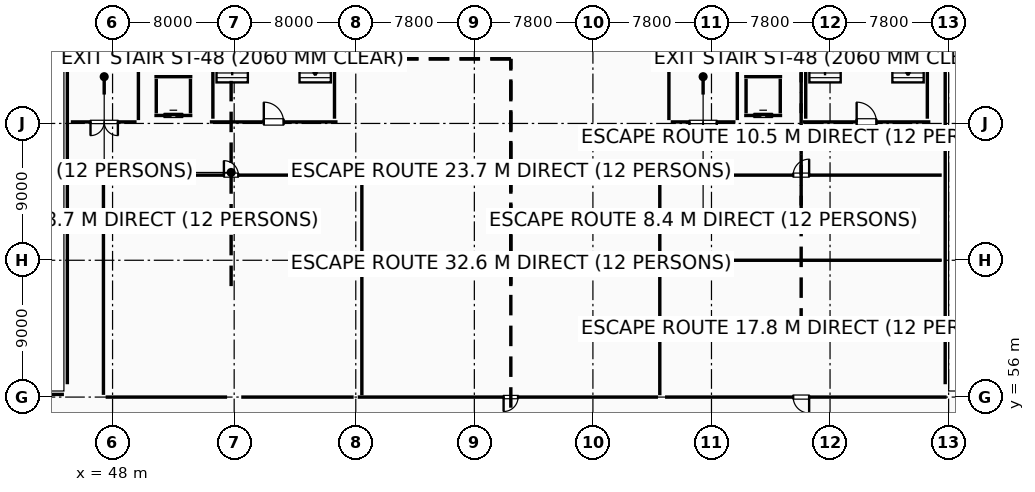
"""IFC4 building model, lengths in metres.
Left out: names, types, materials, properties, quantities, classifications, styles, units other than length and angle.
Written with IfcOpenShell. Run it as: python <this file> out.ifc"""

import sys

from ifc_helpers import new_model, si_unit, direction, frame, frame_2d, origin, origin_2d, place, context, subcontext, project, spatial, rectangle, i_section, extrude, element, fill, save


model = new_model("IFC4")
c1 = context("Model", 3, precision=1e-05, world=origin(), true_north=direction((0.0, 1.0)))
c2 = subcontext(c1, "Body", "Model", "MODEL_VIEW")
j1 = project(units=[si_unit("LENGTHUNIT", "METRE"), si_unit("PLANEANGLEUNIT", "RADIAN")], contexts=[c1])
p1 = place(None, origin())
s1 = spatial("IfcSite", under=j1, at=p1, CompositionType="ELEMENT")
p2 = place(p1, origin())
s2 = spatial("IfcBuilding", under=s1, at=p2, CompositionType="ELEMENT")
p3 = place(p2, frame((0.0, 0.0, -4.8)))
s3 = spatial("IfcBuildingStorey", under=s2, at=p3, CompositionType="ELEMENT", Elevation=-4.8)
p4 = place(p3, frame((48.0, 65.0, 0.0), z_axis=(0.0, 0.0, 1.0), x_axis=(1.0, 0.0, 0.0)))
e1 = element("IfcColumn", 1, at=p4, inside=s3, PredefinedType="COLUMN", context=c2, shape_type="SweptSolid", body=[
    extrude(rectangle(XDim=0.65, YDim=0.65, at=origin_2d()), origin(), (0.0, 0.0, 1.0), 4.8),
])
for number, where, z_axis, x_axis in (
    (2, (56.0, 56.0, 0.0), (0.0, 0.0, 1.0), (1.0, 0.0, 0.0)),
    (3, (56.0, 65.0, 0.0), (0.0, 0.0, 1.0), (1.0, 0.0, 0.0)),
):
    element("IfcColumn", number, at=place(p3, frame(where, z_axis=z_axis, x_axis=x_axis)), inside=s3, PredefinedType="COLUMN", context=c2, shape_type="SweptSolid", body=[
        extrude(rectangle(XDim=0.9, YDim=0.9, at=origin_2d()), origin(), (0.0, 0.0, 1.0), 4.8),
    ])
for number, where, z_axis, x_axis in (
    (4, (64.0, 56.0, 0.0), (0.0, 0.0, 1.0), (1.0, 0.0, 0.0)),
    (5, (64.0, 65.0, 0.0), (0.0, 0.0, 1.0), (1.0, 0.0, 0.0)),
    (6, (64.0, 74.0, 0.0), (0.0, 0.0, 1.0), (1.0, 0.0, 0.0)),
    (7, (71.8, 74.0, 0.0), (0.0, 0.0, 1.0), (1.0, 0.0, 0.0)),
    (8, (79.6, 74.0, 0.0), (0.0, 0.0, 1.0), (1.0, 0.0, 0.0)),
    (9, (103.0, 56.0, 0.0), (0.0, 0.0, 1.0), (1.0, 0.0, 0.0)),
    (10, (103.0, 65.0, 0.0), (0.0, 0.0, 1.0), (1.0, 0.0, 0.0)),
    (11, (103.0, 74.0, 0.0), (0.0, 0.0, 1.0), (1.0, 0.0, 0.0)),
):
    element("IfcColumn", number, at=place(p3, frame(where, z_axis=z_axis, x_axis=x_axis)), inside=s3, PredefinedType="COLUMN", context=c2, shape_type="SweptSolid", body=[
        extrude(i_section(OverallWidth=0.25, OverallDepth=0.45, WebThickness=0.011, FlangeThickness=0.014, FilletRadius=0.015, at=origin_2d()), origin(), (0.0, 0.0, 1.0), 4.8),
    ])
for number, where, z_axis, x_axis in (
    (12, (54.0, 65.7, 0.0), (0.0, 0.0, 1.0), (1.0, 0.0, 0.0)),
    (13, (54.0, 69.8, 0.0), (0.0, 0.0, 1.0), (1.0, 0.0, 0.0)),
):
    element("IfcColumn", number, at=place(p3, frame(where, z_axis=z_axis, x_axis=x_axis)), inside=s3, PredefinedType="COLUMN", context=c2, shape_type="SweptSolid", body=[
        extrude(i_section(OverallWidth=0.25, OverallDepth=0.35, WebThickness=0.01, FlangeThickness=0.012, FilletRadius=0.012, at=origin_2d()), origin(), (0.0, 0.0, 1.0), 4.8),
    ])
p5 = place(p3, frame((16.4, 56.175, 0.0), z_axis=(0.0, 0.0, 1.0), x_axis=(1.0, 0.0, 0.0)))
e14 = element("IfcWall", 14, at=p5, inside=s3, PredefinedType="USERDEFINED", context=c2, shape_type="SweptSolid", body=[
    extrude(rectangle(XDim=28.4, YDim=0.45, at=frame_2d((14.2, 0.0))), origin(), (0.0, 0.0, 1.0), 4.38),
])
for number, where, z_axis, x_axis in (
    (15, (45.025, 56.845, 0.0), (0.0, 0.0, 1.0), (0.0, 1.0, 0.0)),
    (16, (102.775, 82.755, 0.0), (0.0, 0.0, 1.0), (0.0, -1.0, 0.0)),
):
    element("IfcWall", number, at=place(p3, frame(where, z_axis=z_axis, x_axis=x_axis)), inside=s3, PredefinedType="USERDEFINED", context=c2, shape_type="SweptSolid", body=[
        extrude(rectangle(XDim=25.91, YDim=0.45, at=frame_2d((12.955, 0.0))), origin(), (0.0, 0.0, 1.0), 4.38),
    ])
p6 = place(p3, frame((54.4, 74.1, 0.0), z_axis=(0.0, 0.0, 1.0), x_axis=(1.0, 0.0, 0.0)))
e17 = element("IfcWall", 17, at=p6, inside=s3, PredefinedType="SHEAR", context=c2, shape_type="SweptSolid", body=[
    extrude(rectangle(XDim=8.4, YDim=0.4, at=frame_2d((4.2, 0.0))), origin(), (0.0, 0.0, 1.0), 4.48),
])
p7 = place(p6, frame((3.55, 0.0, 0.0)))
e18 = element("IfcOpeningElement", 18, at=p7, cuts=e17, PredefinedType="OPENING", context=c2, shape_type="SweptSolid", body=[
    extrude(rectangle(XDim=1.3, YDim=2.15, at=frame_2d((0.65, 1.075))), frame((0.0, 0.21, 0.0), z_axis=(0.0, -1.0, 0.0), x_axis=(1.0, 0.0, 0.0)), (0.0, 0.0, 1.0), 0.42),
])
for number, where, z_axis, x_axis in (
    (19, (62.6, 74.31, 0.0), (0.0, 0.0, 1.0), (0.0, 1.0, 0.0)),
    (20, (54.6, 82.69, 0.0), (0.0, 0.0, 1.0), (0.0, -1.0, 0.0)),
):
    element("IfcWall", number, at=place(p3, frame(where, z_axis=z_axis, x_axis=x_axis)), inside=s3, PredefinedType="SHEAR", context=c2, shape_type="SweptSolid", body=[
        extrude(rectangle(XDim=8.38, YDim=0.4, at=frame_2d((4.19, 0.0))), origin(), (0.0, 0.0, 1.0), 4.48),
    ])
p8 = place(p3, frame((50.75, 74.525, 0.0), z_axis=(0.0, 0.0, 1.0), x_axis=(1.0, 0.0, 0.0)))
e21 = element("IfcWall", 21, at=p8, inside=s3, PredefinedType="STANDARD", context=c2, shape_type="SweptSolid", body=[
    extrude(rectangle(XDim=2.5, YDim=0.25, at=frame_2d((1.25, 0.0))), origin(), (0.0, 0.0, 1.0), 4.47),
])
p9 = place(p8, frame((0.65, 0.0, 0.0)))
e22 = element("IfcOpeningElement", 22, at=p9, cuts=e21, PredefinedType="OPENING", context=c2, shape_type="SweptSolid", body=[
    extrude(rectangle(XDim=1.2, YDim=2.05, at=frame_2d((0.6, 1.025))), frame((0.0, 0.135, 0.0), z_axis=(0.0, -1.0, 0.0), x_axis=(1.0, 0.0, 0.0)), (0.0, 0.0, 1.0), 0.27),
])
p10 = place(p3, frame((53.25, 77.075, 0.0), z_axis=(0.0, 0.0, 1.0), x_axis=(-1.0, 0.0, 0.0)))
e23 = element("IfcWall", 23, at=p10, inside=s3, PredefinedType="STANDARD", context=c2, shape_type="SweptSolid", body=[
    extrude(rectangle(XDim=2.5, YDim=0.25, at=frame_2d((1.25, 0.0))), origin(), (0.0, 0.0, 1.0), 4.47),
])
for number, where, z_axis, x_axis in (
    (24, (53.125, 74.66, 0.0), (0.0, 0.0, 1.0), (0.0, 1.0, 0.0)),
    (25, (50.875, 76.94, 0.0), (0.0, 0.0, 1.0), (0.0, -1.0, 0.0)),
):
    element("IfcWall", number, at=place(p3, frame(where, z_axis=z_axis, x_axis=x_axis)), inside=s3, PredefinedType="STANDARD", context=c2, shape_type="SweptSolid", body=[
        extrude(rectangle(XDim=2.28, YDim=0.25, at=frame_2d((1.14, 0.0))), origin(), (0.0, 0.0, 1.0), 4.47),
    ])
p11 = place(p3, frame((93.4, 74.1, 0.0), z_axis=(0.0, 0.0, 1.0), x_axis=(1.0, 0.0, 0.0)))
e26 = element("IfcWall", 26, at=p11, inside=s3, PredefinedType="SHEAR", context=c2, shape_type="SweptSolid", body=[
    extrude(rectangle(XDim=8.4, YDim=0.4, at=frame_2d((4.2, 0.0))), origin(), (0.0, 0.0, 1.0), 4.48),
])
p12 = place(p11, frame((3.55, 0.0, 0.0)))
e27 = element("IfcOpeningElement", 27, at=p12, cuts=e26, PredefinedType="OPENING", context=c2, shape_type="SweptSolid", body=[
    extrude(rectangle(XDim=1.3, YDim=2.15, at=frame_2d((0.65, 1.075))), frame((0.0, 0.21, 0.0), z_axis=(0.0, -1.0, 0.0), x_axis=(1.0, 0.0, 0.0)), (0.0, 0.0, 1.0), 0.42),
])
for number, where, z_axis, x_axis in (
    (28, (101.6, 74.31, 0.0), (0.0, 0.0, 1.0), (0.0, 1.0, 0.0)),
    (29, (93.6, 82.69, 0.0), (0.0, 0.0, 1.0), (0.0, -1.0, 0.0)),
):
    element("IfcWall", number, at=place(p3, frame(where, z_axis=z_axis, x_axis=x_axis)), inside=s3, PredefinedType="SHEAR", context=c2, shape_type="SweptSolid", body=[
        extrude(rectangle(XDim=8.38, YDim=0.4, at=frame_2d((4.19, 0.0))), origin(), (0.0, 0.0, 1.0), 4.48),
    ])
p13 = place(p3, frame((89.55, 74.525, 0.0), z_axis=(0.0, 0.0, 1.0), x_axis=(1.0, 0.0, 0.0)))
e30 = element("IfcWall", 30, at=p13, inside=s3, PredefinedType="STANDARD", context=c2, shape_type="SweptSolid", body=[
    extrude(rectangle(XDim=2.5, YDim=0.25, at=frame_2d((1.25, 0.0))), origin(), (0.0, 0.0, 1.0), 4.47),
])
p14 = place(p13, frame((0.65, 0.0, 0.0)))
e31 = element("IfcOpeningElement", 31, at=p14, cuts=e30, PredefinedType="OPENING", context=c2, shape_type="SweptSolid", body=[
    extrude(rectangle(XDim=1.2, YDim=2.05, at=frame_2d((0.6, 1.025))), frame((0.0, 0.135, 0.0), z_axis=(0.0, -1.0, 0.0), x_axis=(1.0, 0.0, 0.0)), (0.0, 0.0, 1.0), 0.27),
])
p15 = place(p3, frame((92.05, 77.075, 0.0), z_axis=(0.0, 0.0, 1.0), x_axis=(-1.0, 0.0, 0.0)))
e32 = element("IfcWall", 32, at=p15, inside=s3, PredefinedType="STANDARD", context=c2, shape_type="SweptSolid", body=[
    extrude(rectangle(XDim=2.5, YDim=0.25, at=frame_2d((1.25, 0.0))), origin(), (0.0, 0.0, 1.0), 4.47),
])
for number, where, z_axis, x_axis in (
    (33, (91.925, 74.66, 0.0), (0.0, 0.0, 1.0), (0.0, 1.0, 0.0)),
    (34, (89.675, 76.94, 0.0), (0.0, 0.0, 1.0), (0.0, -1.0, 0.0)),
):
    element("IfcWall", number, at=place(p3, frame(where, z_axis=z_axis, x_axis=x_axis)), inside=s3, PredefinedType="STANDARD", context=c2, shape_type="SweptSolid", body=[
        extrude(rectangle(XDim=2.28, YDim=0.25, at=frame_2d((1.14, 0.0))), origin(), (0.0, 0.0, 1.0), 4.47),
    ])
p16 = place(p3, frame((85.65, 78.775, 0.0), z_axis=(0.0, 0.0, 1.0), x_axis=(1.0, 0.0, 0.0)))
e35 = element("IfcWall", 35, at=p16, inside=s3, PredefinedType="STANDARD", context=c2, shape_type="SweptSolid", body=[
    extrude(rectangle(XDim=2.3, YDim=0.25, at=frame_2d((1.15, 0.0))), origin(), (0.0, 0.0, 1.0), 4.47),
])
p17 = place(p3, frame((45.254, 77.7, 0.0), z_axis=(0.0, 0.0, 1.0), x_axis=(1.0, 0.0, 0.0)))
e36 = element("IfcWall", 36, at=p17, inside=s3, PredefinedType="PARTITIONING", context=c2, shape_type="SweptSolid", body=[
    extrude(rectangle(XDim=4.326, YDim=0.2, at=frame_2d((2.163, 0.0))), origin(), (0.0, 0.0, 1.0), 4.47),
])
p18 = place(p3, frame((49.7, 77.58, 0.0), z_axis=(0.0, 0.0, 1.0), x_axis=(0.0, -1.0, 0.0)))
e37 = element("IfcWall", 37, at=p18, inside=s3, PredefinedType="PARTITIONING", context=c2, shape_type="SweptSolid", body=[
    extrude(rectangle(XDim=3.36, YDim=0.2, at=frame_2d((1.68, 0.0))), origin(), (0.0, 0.0, 1.0), 4.47),
])
p19 = place(p3, frame((49.58, 74.1, 0.0), z_axis=(0.0, 0.0, 1.0), x_axis=(-1.0, 0.0, 0.0)))
e38 = element("IfcWall", 38, at=p19, inside=s3, PredefinedType="PARTITIONING", context=c2, shape_type="SweptSolid", body=[
    extrude(rectangle(XDim=4.326, YDim=0.2, at=frame_2d((2.163, 0.0))), origin(), (0.0, 0.0, 1.0), 4.47),
])
p20 = place(p19, frame((1.23, 0.0, 0.0)))
e39 = element("IfcOpeningElement", 39, at=p20, cuts=e38, PredefinedType="OPENING", context=c2, shape_type="SweptSolid", body=[
    extrude(rectangle(XDim=1.8, YDim=2.15, at=frame_2d((0.9, 1.075))), frame((0.0, 0.11, 0.0), z_axis=(0.0, -1.0, 0.0), x_axis=(1.0, 0.0, 0.0)), (0.0, 0.0, 1.0), 0.22),
])
p21 = place(p3, frame((84.6, 74.22, 0.0), z_axis=(0.0, 0.0, 1.0), x_axis=(0.0, 1.0, 0.0)))
e40 = element("IfcWall", 40, at=p21, inside=s3, PredefinedType="PARTITIONING", context=c2, shape_type="SweptSolid", body=[
    extrude(rectangle(XDim=3.36, YDim=0.2, at=frame_2d((1.68, 0.0))), origin(), (0.0, 0.0, 1.0), 4.47),
])
p22 = place(p3, frame((84.72, 77.7, 0.0), z_axis=(0.0, 0.0, 1.0), x_axis=(1.0, 0.0, 0.0)))
e41 = element("IfcWall", 41, at=p22, inside=s3, PredefinedType="PARTITIONING", context=c2, shape_type="SweptSolid", body=[
    extrude(rectangle(XDim=4.26, YDim=0.2, at=frame_2d((2.13, 0.0))), origin(), (0.0, 0.0, 1.0), 4.47),
])
p23 = place(p3, frame((89.1, 77.58, 0.0), z_axis=(0.0, 0.0, 1.0), x_axis=(0.0, -1.0, 0.0)))
e42 = element("IfcWall", 42, at=p23, inside=s3, PredefinedType="PARTITIONING", context=c2, shape_type="SweptSolid", body=[
    extrude(rectangle(XDim=3.36, YDim=0.2, at=frame_2d((1.68, 0.0))), origin(), (0.0, 0.0, 1.0), 4.47),
])
p24 = place(p3, frame((88.98, 74.1, 0.0), z_axis=(0.0, 0.0, 1.0), x_axis=(-1.0, 0.0, 0.0)))
e43 = element("IfcWall", 43, at=p24, inside=s3, PredefinedType="PARTITIONING", context=c2, shape_type="SweptSolid", body=[
    extrude(rectangle(XDim=4.26, YDim=0.2, at=frame_2d((2.13, 0.0))), origin(), (0.0, 0.0, 1.0), 4.39),
])
p25 = place(p24, frame((1.23, 0.0, 0.0)))
e44 = element("IfcOpeningElement", 44, at=p25, cuts=e43, PredefinedType="OPENING", context=c2, shape_type="SweptSolid", body=[
    extrude(rectangle(XDim=1.8, YDim=2.15, at=frame_2d((0.9, 1.075))), frame((0.0, 0.11, 0.0), z_axis=(0.0, -1.0, 0.0), x_axis=(1.0, 0.0, 0.0)), (0.0, 0.0, 1.0), 0.22),
])
p26 = place(p3, frame((64.52, 70.6, 0.0), z_axis=(0.0, 0.0, 1.0), x_axis=(1.0, 0.0, 0.0)))
e45 = element("IfcWall", 45, at=p26, inside=s3, PredefinedType="PARTITIONING", context=c2, shape_type="SweptSolid", body=[
    extrude(rectangle(XDim=19.36, YDim=0.2, at=frame_2d((9.68, 0.0))), origin(), (0.0, 0.0, 1.0), 4.39),
])
p27 = place(p26, frame((9.205, 0.0, 0.0)))
e46 = element("IfcOpeningElement", 46, at=p27, cuts=e45, PredefinedType="OPENING", context=c2, shape_type="SweptSolid", body=[
    extrude(rectangle(XDim=0.95, YDim=2.15, at=frame_2d((0.475, 1.075))), frame((0.0, 0.11, 0.0), z_axis=(0.0, -1.0, 0.0), x_axis=(1.0, 0.0, 0.0)), (0.0, 0.0, 1.0), 0.22),
])
p28 = place(p3, frame((84.0, 70.48, 0.0), z_axis=(0.0, 0.0, 1.0), x_axis=(0.0, -1.0, 0.0)))
e47 = element("IfcWall", 47, at=p28, inside=s3, PredefinedType="PARTITIONING", context=c2, shape_type="SweptSolid", body=[
    extrude(rectangle(XDim=14.36, YDim=0.2, at=frame_2d((7.18, 0.0))), origin(), (0.0, 0.0, 1.0), 4.39),
])
p29 = place(p3, frame((83.88, 56.0, 0.0), z_axis=(0.0, 0.0, 1.0), x_axis=(-1.0, 0.0, 0.0)))
e48 = element("IfcWall", 48, at=p29, inside=s3, PredefinedType="PARTITIONING", context=c2, shape_type="SweptSolid", body=[
    extrude(rectangle(XDim=19.751, YDim=0.2, at=frame_2d((9.875, 0.0))), origin(), (0.0, 0.0, 1.0), 3.78),
])
p30 = place(p29, frame((9.205, 0.0, 0.0)))
e49 = element("IfcOpeningElement", 49, at=p30, cuts=e48, PredefinedType="OPENING", context=c2, shape_type="SweptSolid", body=[
    extrude(rectangle(XDim=0.95, YDim=2.15, at=frame_2d((0.475, 1.075))), frame((0.0, 0.11, 0.0), z_axis=(0.0, -1.0, 0.0), x_axis=(1.0, 0.0, 0.0)), (0.0, 0.0, 1.0), 0.22),
])
p31 = place(p3, frame((64.4, 56.12, 0.0), z_axis=(0.0, 0.0, 1.0), x_axis=(0.0, 1.0, 0.0)))
e50 = element("IfcWall", 50, at=p31, inside=s3, PredefinedType="PARTITIONING", context=c2, shape_type="SweptSolid", body=[
    extrude(rectangle(XDim=14.36, YDim=0.2, at=frame_2d((7.18, 0.0))), origin(), (0.0, 0.0, 1.0), 3.38),
])
p32 = place(p3, frame((84.345, 65.0, 0.0), z_axis=(0.0, 0.0, 1.0), x_axis=(1.0, 0.0, 0.0)))
e51 = element("IfcWall", 51, at=p32, inside=s3, PredefinedType="PARTITIONING", context=c2, shape_type="SweptSolid", body=[
    extrude(rectangle(XDim=18.201, YDim=0.25, at=frame_2d((9.101, 0.0))), origin(), (0.0, 0.0, 1.0), 3.78),
])
p33 = place(p3, frame((102.871, 56.0, 0.0), z_axis=(0.0, 0.0, 1.0), x_axis=(-1.0, 0.0, 0.0)))
e52 = element("IfcWall", 52, at=p33, inside=s3, PredefinedType="PARTITIONING", context=c2, shape_type="SweptSolid", body=[
    extrude(rectangle(XDim=18.526, YDim=0.25, at=frame_2d((9.263, 0.0))), origin(), (0.0, 0.0, 1.0), 3.78),
])
p34 = place(p33, frame((9.046, 0.0, 0.0)))
e53 = element("IfcOpeningElement", 53, at=p34, cuts=e52, PredefinedType="OPENING", context=c2, shape_type="SweptSolid", body=[
    extrude(rectangle(XDim=1.05, YDim=2.15, at=frame_2d((0.525, 1.075))), frame((0.0, 0.135, 0.0), z_axis=(0.0, -1.0, 0.0), x_axis=(1.0, 0.0, 0.0)), (0.0, 0.0, 1.0), 0.27),
])
p35 = place(p3, frame((84.345, 70.6, 0.0), z_axis=(0.0, 0.0, 1.0), x_axis=(1.0, 0.0, 0.0)))
e54 = element("IfcWall", 54, at=p35, inside=s3, PredefinedType="PARTITIONING", context=c2, shape_type="SweptSolid", body=[
    extrude(rectangle(XDim=18.201, YDim=0.25, at=frame_2d((9.101, 0.0))), origin(), (0.0, 0.0, 1.0), 4.39),
])
p36 = place(p35, frame((8.43, 0.0, 0.0)))
e55 = element("IfcOpeningElement", 55, at=p36, cuts=e54, PredefinedType="OPENING", context=c2, shape_type="SweptSolid", body=[
    extrude(rectangle(XDim=1.05, YDim=2.15, at=frame_2d((0.525, 1.075))), frame((0.0, 0.135, 0.0), z_axis=(0.0, -1.0, 0.0), x_axis=(1.0, 0.0, 0.0)), (0.0, 0.0, 1.0), 0.27),
])
p37 = place(p3, frame((47.545, 70.6, 0.0), z_axis=(0.0, 0.0, 1.0), x_axis=(1.0, 0.0, 0.0)))
e56 = element("IfcWall", 56, at=p37, inside=s3, PredefinedType="PARTITIONING", context=c2, shape_type="SweptSolid", body=[
    extrude(rectangle(XDim=16.51, YDim=0.25, at=frame_2d((8.255, 0.0))), origin(), (0.0, 0.0, 1.0), 4.39),
])
p38 = place(p37, frame((7.78, 0.0, 0.0)))
e57 = element("IfcOpeningElement", 57, at=p38, cuts=e56, PredefinedType="OPENING", context=c2, shape_type="SweptSolid", body=[
    extrude(rectangle(XDim=0.95, YDim=2.15, at=frame_2d((0.475, 1.075))), frame((0.0, 0.135, 0.0), z_axis=(0.0, -1.0, 0.0), x_axis=(1.0, 0.0, 0.0)), (0.0, 0.0, 1.0), 0.27),
])
p39 = place(p3, frame((63.86, 56.0, 0.0), z_axis=(0.0, 0.0, 1.0), x_axis=(-1.0, 0.0, 0.0)))
e58 = element("IfcWall", 58, at=p39, inside=s3, PredefinedType="PARTITIONING", context=c2, shape_type="SweptSolid", body=[
    extrude(rectangle(XDim=7.395, YDim=0.25, at=frame_2d((3.698, 0.0))), origin(), (0.0, 0.0, 1.0), 4.08),
])
p40 = place(p3, frame((55.535, 56.0, 0.0), z_axis=(0.0, 0.0, 1.0), x_axis=(-1.0, 0.0, 0.0)))
e59 = element("IfcWall", 59, at=p40, inside=s3, PredefinedType="PARTITIONING", context=c2, shape_type="SweptSolid", body=[
    extrude(rectangle(XDim=7.99, YDim=0.25, at=frame_2d((3.995, 0.0))), origin(), (0.0, 0.0, 1.0), 4.47),
])
p41 = place(p3, frame((47.4, 56.145, 0.0), z_axis=(0.0, 0.0, 1.0), x_axis=(0.0, 1.0, 0.0)))
e60 = element("IfcWall", 60, at=p41, inside=s3, PredefinedType="PARTITIONING", context=c2, shape_type="SweptSolid", body=[
    extrude(rectangle(XDim=14.31, YDim=0.25, at=frame_2d((7.155, 0.0))), origin(), (0.0, 0.0, 1.0), 4.47),
])
p42 = place(p7, origin())
e61 = element("IfcDoor", 61, at=p42, inside=s3, OperationType="SINGLE_SWING_LEFT", PredefinedType="DOOR", context=c2, shape_type="SweptSolid", body=[
    extrude(rectangle(XDim=1.3, YDim=2.15, at=frame_2d((0.65, 1.075))), frame((0.0, 0.025, 0.0), z_axis=(0.0, -1.0, 0.0), x_axis=(1.0, 0.0, 0.0)), (0.0, 0.0, 1.0), 0.05),
])
fill(e18, e61)
p43 = place(p9, origin())
e62 = element("IfcDoor", 62, at=p43, inside=s3, OperationType="DOUBLE_DOOR_SLIDING", PredefinedType="DOOR", context=c2, shape_type="SweptSolid", body=[
    extrude(rectangle(XDim=1.2, YDim=2.05, at=frame_2d((0.6, 1.025))), frame((0.0, 0.025, 0.0), z_axis=(0.0, -1.0, 0.0), x_axis=(1.0, 0.0, 0.0)), (0.0, 0.0, 1.0), 0.05),
])
fill(e22, e62)
p44 = place(p12, origin())
e63 = element("IfcDoor", 63, at=p44, inside=s3, OperationType="SINGLE_SWING_LEFT", PredefinedType="DOOR", context=c2, shape_type="SweptSolid", body=[
    extrude(rectangle(XDim=1.3, YDim=2.15, at=frame_2d((0.65, 1.075))), frame((0.0, 0.025, 0.0), z_axis=(0.0, -1.0, 0.0), x_axis=(1.0, 0.0, 0.0)), (0.0, 0.0, 1.0), 0.05),
])
fill(e27, e63)
p45 = place(p14, origin())
e64 = element("IfcDoor", 64, at=p45, inside=s3, OperationType="DOUBLE_DOOR_SLIDING", PredefinedType="DOOR", context=c2, shape_type="SweptSolid", body=[
    extrude(rectangle(XDim=1.2, YDim=2.05, at=frame_2d((0.6, 1.025))), frame((0.0, 0.025, 0.0), z_axis=(0.0, -1.0, 0.0), x_axis=(1.0, 0.0, 0.0)), (0.0, 0.0, 1.0), 0.05),
])
fill(e31, e64)
p46 = place(p20, origin())
e65 = element("IfcDoor", 65, at=p46, inside=s3, OperationType="DOUBLE_DOOR_SINGLE_SWING", PredefinedType="DOOR", context=c2, shape_type="SweptSolid", body=[
    extrude(rectangle(XDim=1.8, YDim=2.15, at=frame_2d((0.9, 1.075))), frame((0.0, 0.025, 0.0), z_axis=(0.0, -1.0, 0.0), x_axis=(1.0, 0.0, 0.0)), (0.0, 0.0, 1.0), 0.05),
])
fill(e39, e65)
p47 = place(p25, origin())
e66 = element("IfcDoor", 66, at=p47, inside=s3, OperationType="DOUBLE_DOOR_SINGLE_SWING", PredefinedType="DOOR", context=c2, shape_type="SweptSolid", body=[
    extrude(rectangle(XDim=1.8, YDim=2.15, at=frame_2d((0.9, 1.075))), frame((0.0, 0.025, 0.0), z_axis=(0.0, -1.0, 0.0), x_axis=(1.0, 0.0, 0.0)), (0.0, 0.0, 1.0), 0.05),
])
fill(e44, e66)
p48 = place(p27, origin())
e67 = element("IfcDoor", 67, at=p48, inside=s3, OperationType="SINGLE_SWING_LEFT", PredefinedType="DOOR", context=c2, shape_type="SweptSolid", body=[
    extrude(rectangle(XDim=0.95, YDim=2.15, at=frame_2d((0.475, 1.075))), frame((0.0, 0.025, 0.0), z_axis=(0.0, -1.0, 0.0), x_axis=(1.0, 0.0, 0.0)), (0.0, 0.0, 1.0), 0.05),
])
fill(e46, e67)
p49 = place(p30, origin())
e68 = element("IfcDoor", 68, at=p49, inside=s3, OperationType="SINGLE_SWING_RIGHT", PredefinedType="DOOR", context=c2, shape_type="SweptSolid", body=[
    extrude(rectangle(XDim=0.95, YDim=2.15, at=frame_2d((0.475, 1.075))), frame((0.0, 0.025, 0.0), z_axis=(0.0, -1.0, 0.0), x_axis=(1.0, 0.0, 0.0)), (0.0, 0.0, 1.0), 0.05),
])
fill(e49, e68)
p50 = place(p34, origin())
e69 = element("IfcDoor", 69, at=p50, inside=s3, OperationType="SINGLE_SWING_LEFT", PredefinedType="DOOR", context=c2, shape_type="SweptSolid", body=[
    extrude(rectangle(XDim=1.05, YDim=2.15, at=frame_2d((0.525, 1.075))), frame((0.0, 0.025, 0.0), z_axis=(0.0, -1.0, 0.0), x_axis=(1.0, 0.0, 0.0)), (0.0, 0.0, 1.0), 0.05),
])
fill(e53, e69)
p51 = place(p36, origin())
e70 = element("IfcDoor", 70, at=p51, inside=s3, OperationType="SINGLE_SWING_RIGHT", PredefinedType="DOOR", context=c2, shape_type="SweptSolid", body=[
    extrude(rectangle(XDim=1.05, YDim=2.15, at=frame_2d((0.525, 1.075))), frame((0.0, 0.025, 0.0), z_axis=(0.0, -1.0, 0.0), x_axis=(1.0, 0.0, 0.0)), (0.0, 0.0, 1.0), 0.05),
])
fill(e55, e70)
p52 = place(p38, origin())
e71 = element("IfcDoor", 71, at=p52, inside=s3, OperationType="SINGLE_SWING_LEFT", PredefinedType="DOOR", context=c2, shape_type="SweptSolid", body=[
    extrude(rectangle(XDim=0.95, YDim=2.15, at=frame_2d((0.475, 1.075))), frame((0.0, 0.025, 0.0), z_axis=(0.0, -1.0, 0.0), x_axis=(1.0, 0.0, 0.0)), (0.0, 0.0, 1.0), 0.05),
])
fill(e57, e71)
save(model, sys.argv[1])
